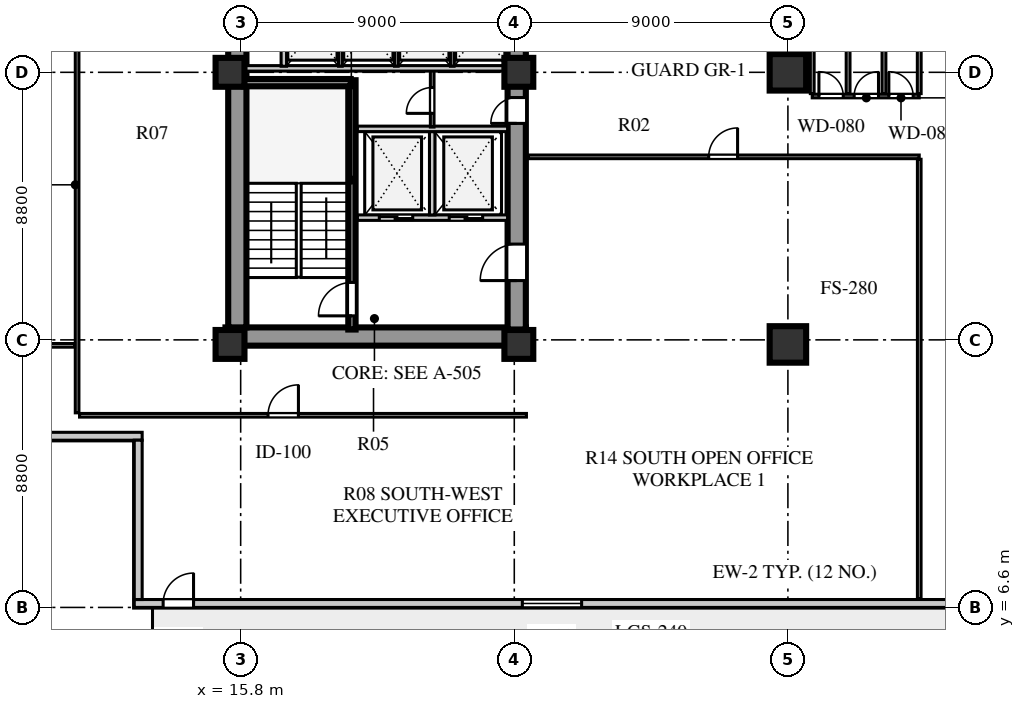
"""IFC4 building model, lengths in metres.
Left out: names, types, materials, properties, quantities, classifications, styles, units other than length and angle.
Written with IfcOpenShell. Run it as: python <this file> out.ifc"""

import sys

from ifc_helpers import new_model, si_unit, direction, frame, frame_2d, origin, origin_2d, place, context, subcontext, project, spatial, rectangle, extrude, element, fill, save


model = new_model("IFC4")
c1 = context("Model", 3, precision=1e-05, world=origin(), true_north=direction((0.0, 1.0)))
c2 = subcontext(c1, "Body", "Model", "MODEL_VIEW")
j1 = project(units=[si_unit("LENGTHUNIT", "METRE"), si_unit("PLANEANGLEUNIT", "RADIAN")], contexts=[c1])
p1 = place(None, origin())
s1 = spatial("IfcSite", under=j1, at=p1, CompositionType="ELEMENT")
p2 = place(p1, origin())
s2 = spatial("IfcBuilding", under=s1, at=p2, CompositionType="ELEMENT")
p3 = place(p2, frame((0.0, 0.0, 34.0)))
s3 = spatial("IfcBuildingStorey", under=s2, at=p3, CompositionType="ELEMENT", Elevation=34.0)
p4 = place(p3, frame((15.3, 15.51, 0.0), z_axis=(0.0, 0.0, 1.0), x_axis=(1.0, 0.0, 0.0)))
e1 = element("IfcWall", 1, at=p4, inside=s3, PredefinedType="SHEAR", context=c2, shape_type="SweptSolid", body=[
    extrude(rectangle(XDim=9.88, YDim=0.6, at=frame_2d((4.94, 0.0))), origin(), (0.0, 0.0, 1.0), 3.72),
])
p5 = place(p3, frame((15.69, 15.81, 0.0), z_axis=(0.0, 0.0, 1.0), x_axis=(0.0, 1.0, 0.0)))
e2 = element("IfcWall", 2, at=p5, inside=s3, PredefinedType="SHEAR", context=c2, shape_type="SweptSolid", body=[
    extrude(rectangle(XDim=25.63, YDim=0.6, at=frame_2d((12.815, 0.0))), origin(), (0.0, 0.0, 1.0), 3.72),
])
p6 = place(p3, frame((24.88, 15.74, 0.0), z_axis=(0.0, 0.0, 1.0), x_axis=(0.0, 1.0, 0.0)))
e3 = element("IfcWall", 3, at=p6, inside=s3, PredefinedType="SHEAR", context=c2, shape_type="SweptSolid", body=[
    extrude(rectangle(XDim=25.76, YDim=0.6, at=frame_2d((12.88, 0.0))), origin(), (0.0, 0.0, 1.0), 3.72),
])
p7 = place(p6, frame((1.61, 0.0, 0.0)))
e4 = element("IfcOpeningElement", 4, at=p7, cuts=e3, PredefinedType="OPENING", context=c2, shape_type="SweptSolid", body=[
    extrude(rectangle(XDim=1.2, YDim=2.1, at=frame_2d((0.6, 1.05))), frame((0.0, 0.31, 0.0), z_axis=(0.0, -1.0, 0.0), x_axis=(1.0, 0.0, 0.0)), (0.0, 0.0, 1.0), 0.62),
])
p8 = place(p6, frame((6.78, 0.0, 0.0)))
e5 = element("IfcOpeningElement", 5, at=p8, cuts=e3, PredefinedType="OPENING", context=c2, shape_type="SweptSolid", body=[
    extrude(rectangle(XDim=0.85, YDim=2.06, at=frame_2d((0.425, 1.03))), frame((0.0, 0.31, 0.0), z_axis=(0.0, -1.0, 0.0), x_axis=(1.0, 0.0, 0.0)), (0.0, 0.0, 1.0), 0.62),
])
p9 = place(p6, frame((12.11, 0.0, 0.0)))
e6 = element("IfcOpeningElement", 6, at=p9, cuts=e3, PredefinedType="OPENING", context=c2, shape_type="SweptSolid", body=[
    extrude(rectangle(XDim=1.5, YDim=2.12, at=frame_2d((0.75, 1.06))), frame((0.0, 0.31, 0.0), z_axis=(0.0, -1.0, 0.0), x_axis=(1.0, 0.0, 0.0)), (0.0, 0.0, 1.0), 0.62),
])
p10 = place(p6, frame((20.11, 0.0, 0.0)))
e7 = element("IfcOpeningElement", 7, at=p10, cuts=e3, PredefinedType="OPENING", context=c2, shape_type="SweptSolid", body=[
    extrude(rectangle(XDim=1.2, YDim=2.12, at=frame_2d((0.6, 1.06))), frame((0.0, 0.31, 0.0), z_axis=(0.0, -1.0, 0.0), x_axis=(1.0, 0.0, 0.0)), (0.0, 0.0, 1.0), 0.62),
])
p11 = place(p6, frame((24.01, 0.0, 0.0)))
e8 = element("IfcOpeningElement", 8, at=p11, cuts=e3, PredefinedType="OPENING", context=c2, shape_type="SweptSolid", body=[
    extrude(rectangle(XDim=0.95, YDim=2.1, at=frame_2d((0.475, 1.05))), frame((0.0, 0.31, 0.0), z_axis=(0.0, -1.0, 0.0), x_axis=(1.0, 0.0, 0.0)), (0.0, 0.0, 1.0), 0.62),
])
for number, where, z_axis, x_axis in (
    (9, (15.45, 15.25, 0.0), (0.0, 0.0, 1.0), (1.0, 0.0, 0.0)),
    (10, (15.45, 24.2, 0.0), (0.0, 0.0, 1.0), (1.0, 0.0, 0.0)),
    (11, (24.95, 15.25, 0.0), (0.0, 0.0, 1.0), (1.0, 0.0, 0.0)),
    (12, (24.95, 24.2, 0.0), (0.0, 0.0, 1.0), (1.0, 0.0, 0.0)),
):
    element("IfcColumn", number, at=place(p3, frame(where, z_axis=z_axis, x_axis=x_axis)), inside=s3, PredefinedType="COLUMN", context=c2, shape_type="SweptSolid", body=[
        extrude(rectangle(XDim=0.95, YDim=0.95, at=origin_2d()), origin(), (0.0, 0.0, 1.0), 3.72),
    ])
for number, where, z_axis, x_axis in (
    (13, (33.8, 15.25, 0.0), (0.0, 0.0, 1.0), (1.0, 0.0, 0.0)),
    (14, (33.8, 24.2, 0.0), (0.0, 0.0, 1.0), (1.0, 0.0, 0.0)),
):
    element("IfcColumn", number, at=place(p3, frame(where, z_axis=z_axis, x_axis=x_axis)), inside=s3, PredefinedType="COLUMN", context=c2, shape_type="SweptSolid", body=[
        extrude(rectangle(XDim=1.2, YDim=1.2, at=origin_2d()), origin(), (0.0, 0.0, 1.0), 3.72),
    ])
p12 = place(p3, frame((12.3, 6.73, 0.0), z_axis=(0.0, 0.0, 1.0), x_axis=(1.0, 0.0, 0.0)))
e15 = element("IfcWall", 15, at=p12, inside=s3, PredefinedType="SOLIDWALL", context=c2, shape_type="SweptSolid", body=[
    extrude(rectangle(XDim=34.0, YDim=0.26, at=frame_2d((17.0, 0.0))), origin(), (0.0, 0.0, 1.0), 3.72),
])
p13 = place(p12, frame((0.95, 0.0, 0.0)))
e16 = element("IfcOpeningElement", 16, at=p13, cuts=e15, PredefinedType="OPENING", context=c2, shape_type="SweptSolid", body=[
    extrude(rectangle(XDim=1.0, YDim=2.05, at=frame_2d((0.5, 1.025))), frame((0.0, 0.14, 0.0), z_axis=(0.0, -1.0, 0.0), x_axis=(1.0, 0.0, 0.0)), (0.0, 0.0, 1.0), 0.28),
])
p14 = place(p12, frame((12.765, 0.0, 0.8)))
e17 = element("IfcOpeningElement", 17, at=p14, cuts=e15, PredefinedType="OPENING", context=c2, shape_type="SweptSolid", body=[
    extrude(rectangle(XDim=1.95, YDim=2.0, at=frame_2d((0.975, 1.0))), frame((0.0, 0.14, 0.0), z_axis=(0.0, -1.0, 0.0), x_axis=(1.0, 0.0, 0.0)), (0.0, 0.0, 1.0), 0.28),
])
p15 = place(p12, frame((28.73, 0.0, 0.8)))
e18 = element("IfcOpeningElement", 18, at=p15, cuts=e15, PredefinedType="OPENING", context=c2, shape_type="SweptSolid", body=[
    extrude(rectangle(XDim=2.25, YDim=2.0, at=frame_2d((1.125, 1.0))), frame((0.0, 0.14, 0.0), z_axis=(0.0, -1.0, 0.0), x_axis=(1.0, 0.0, 0.0)), (0.0, 0.0, 1.0), 0.28),
])
p16 = place(p3, frame((6.8, 12.23, 0.0), z_axis=(0.0, 0.0, 1.0), x_axis=(1.0, 0.0, 0.0)))
e19 = element("IfcWall", 19, at=p16, inside=s3, PredefinedType="SOLIDWALL", context=c2, shape_type="SweptSolid", body=[
    extrude(rectangle(XDim=5.76, YDim=0.26, at=frame_2d((2.88, 0.0))), origin(), (0.0, 0.0, 1.0), 3.72),
])
p17 = place(p3, frame((12.43, 12.1, 0.0), z_axis=(0.0, 0.0, 1.0), x_axis=(0.0, -1.0, 0.0)))
e20 = element("IfcWall", 20, at=p17, inside=s3, PredefinedType="SOLIDWALL", context=c2, shape_type="SweptSolid", body=[
    extrude(rectangle(XDim=5.24, YDim=0.26, at=frame_2d((2.62, 0.0))), origin(), (0.0, 0.0, 1.0), 3.72),
])
p18 = place(p3, frame((19.46, 15.74, 0.0), z_axis=(0.0, 0.0, 1.0), x_axis=(0.0, 1.0, 0.0)))
e21 = element("IfcWall", 21, at=p18, inside=s3, PredefinedType="SHEAR", context=c2, shape_type="SweptSolid", body=[
    extrude(rectangle(XDim=8.2, YDim=0.24, at=frame_2d((4.1, 0.0))), origin(), (0.0, 0.0, 1.0), 4.0),
])
p19 = place(p18, frame((0.45, 0.0, 0.0)))
e22 = element("IfcOpeningElement", 22, at=p19, cuts=e21, PredefinedType="OPENING", context=c2, shape_type="SweptSolid", body=[
    extrude(rectangle(XDim=1.1, YDim=2.1, at=frame_2d((0.55, 1.05))), frame((0.0, 0.13, 0.0), z_axis=(0.0, -1.0, 0.0), x_axis=(1.0, 0.0, 0.0)), (0.0, 0.0, 1.0), 0.26),
])
p20 = place(p3, frame((15.9, 23.86, 0.0), z_axis=(0.0, 0.0, 1.0), x_axis=(1.0, 0.0, 0.0)))
e23 = element("IfcWall", 23, at=p20, inside=s3, PredefinedType="SHEAR", context=c2, shape_type="SweptSolid", body=[
    extrude(rectangle(XDim=3.52, YDim=0.24, at=frame_2d((1.76, 0.0))), origin(), (0.0, 0.0, 1.0), 4.0),
])
p21 = place(p3, frame((19.64, 19.42, 0.0), z_axis=(0.0, 0.0, 1.0), x_axis=(1.0, 0.0, 0.0)))
e24 = element("IfcWall", 24, at=p21, inside=s3, PredefinedType="SOLIDWALL", context=c2, shape_type="SweptSolid", body=[
    extrude(rectangle(XDim=4.94, YDim=0.18, at=frame_2d((2.47, 0.0))), origin(), (0.0, 0.0, 1.0), 3.72),
])
p22 = place(p21, frame((0.72, 0.0, 0.0)))
e25 = element("IfcOpeningElement", 25, at=p22, cuts=e24, PredefinedType="OPENING", context=c2, shape_type="SweptSolid", body=[
    extrude(rectangle(XDim=1.1, YDim=2.1, at=frame_2d((0.55, 1.05))), frame((0.0, 0.1, 0.0), z_axis=(0.0, -1.0, 0.0), x_axis=(1.0, 0.0, 0.0)), (0.0, 0.0, 1.0), 0.2),
])
p23 = place(p21, frame((3.02, 0.0, 0.0)))
e26 = element("IfcOpeningElement", 26, at=p23, cuts=e24, PredefinedType="OPENING", context=c2, shape_type="SweptSolid", body=[
    extrude(rectangle(XDim=1.1, YDim=2.1, at=frame_2d((0.55, 1.05))), frame((0.0, 0.1, 0.0), z_axis=(0.0, -1.0, 0.0), x_axis=(1.0, 0.0, 0.0)), (0.0, 0.0, 1.0), 0.2),
])
p24 = place(p3, frame((22.1, 19.51, 0.0), z_axis=(0.0, 0.0, 1.0), x_axis=(0.0, 1.0, 0.0)))
e27 = element("IfcWall", 27, at=p24, inside=s3, PredefinedType="SOLIDWALL", context=c2, shape_type="SweptSolid", body=[
    extrude(rectangle(XDim=2.74, YDim=0.18, at=frame_2d((1.37, 0.0))), origin(), (0.0, 0.0, 1.0), 3.72),
])
p25 = place(p3, frame((19.64, 22.34, 0.0), z_axis=(0.0, 0.0, 1.0), x_axis=(1.0, 0.0, 0.0)))
e28 = element("IfcWall", 28, at=p25, inside=s3, PredefinedType="SOLIDWALL", context=c2, shape_type="SweptSolid", body=[
    extrude(rectangle(XDim=4.94, YDim=0.18, at=frame_2d((2.47, 0.0))), origin(), (0.0, 0.0, 1.0), 3.72),
])
p26 = place(p3, frame((22.1, 22.4, 0.0), z_axis=(0.0, 0.0, 1.0), x_axis=(0.0, 1.0, 0.0)))
e29 = element("IfcWall", 29, at=p26, inside=s3, PredefinedType="PARTITIONING", context=c2, shape_type="SweptSolid", body=[
    extrude(rectangle(XDim=1.88, YDim=0.12, at=frame_2d((0.94, 0.0))), origin(), (0.0, 0.0, 1.0), 3.72),
])
p27 = place(p26, frame((0.45, 0.0, 0.0)))
e30 = element("IfcOpeningElement", 30, at=p27, cuts=e29, PredefinedType="OPENING", context=c2, shape_type="SweptSolid", body=[
    extrude(rectangle(XDim=0.85, YDim=2.06, at=frame_2d((0.425, 1.03))), frame((0.0, 0.07, 0.0), z_axis=(0.0, -1.0, 0.0), x_axis=(1.0, 0.0, 0.0)), (0.0, 0.0, 1.0), 0.14),
])
p28 = place(p3, frame((15.9, 24.33, 0.0), z_axis=(0.0, 0.0, 1.0), x_axis=(1.0, 0.0, 0.0)))
e31 = element("IfcWall", 31, at=p28, inside=s3, PredefinedType="SOLIDWALL", context=c2, shape_type="SweptSolid", body=[
    extrude(rectangle(XDim=8.68, YDim=0.18, at=frame_2d((4.34, 0.0))), origin(), (0.0, 0.0, 1.0), 3.02),
])
p29 = place(p3, frame((17.22, 24.4, 0.0), z_axis=(0.0, 0.0, 1.0), x_axis=(0.0, 1.0, 0.0)))
e32 = element("IfcWall", 32, at=p29, inside=s3, PredefinedType="SOLIDWALL", context=c2, shape_type="SweptSolid", body=[
    extrude(rectangle(XDim=2.05, YDim=0.18, at=frame_2d((1.025, 0.0))), origin(), (0.0, 0.0, 1.0), 3.72),
])
for number, where, z_axis, x_axis in (
    (33, (19.08, 24.4, 0.0), (0.0, 0.0, 1.0), (0.0, 1.0, 0.0)),
    (34, (20.92, 24.4, 0.0), (0.0, 0.0, 1.0), (0.0, 1.0, 0.0)),
    (35, (22.76, 24.4, 0.0), (0.0, 0.0, 1.0), (0.0, 1.0, 0.0)),
):
    element("IfcWall", number, at=place(p3, frame(where, z_axis=z_axis, x_axis=x_axis)), inside=s3, PredefinedType="PARTITIONING", context=c2, shape_type="SweptSolid", body=[
        extrude(rectangle(XDim=2.05, YDim=0.12, at=frame_2d((1.025, 0.0))), origin(), (0.0, 0.0, 1.0), 3.72),
    ])
p30 = place(p3, frame((25.25, 21.42, 0.0), z_axis=(0.0, 0.0, 1.0), x_axis=(1.0, 0.0, 0.0)))
e36 = element("IfcWall", 36, at=p30, inside=s3, PredefinedType="PARTITIONING", context=c2, shape_type="SweptSolid", body=[
    extrude(rectangle(XDim=12.87, YDim=0.12, at=frame_2d((6.435, 0.0))), origin(), (0.0, 0.0, 1.0), 3.32),
])
p31 = place(p30, frame((5.945, 0.0, 0.0)))
e37 = element("IfcOpeningElement", 37, at=p31, cuts=e36, PredefinedType="OPENING", context=c2, shape_type="SweptSolid", body=[
    extrude(rectangle(XDim=0.95, YDim=2.08, at=frame_2d((0.475, 1.04))), frame((0.0, 0.07, 0.0), z_axis=(0.0, -1.0, 0.0), x_axis=(1.0, 0.0, 0.0)), (0.0, 0.0, 1.0), 0.14),
])
p32 = place(p3, frame((38.12, 6.88, 0.0), z_axis=(0.0, 0.0, 1.0), x_axis=(0.0, 1.0, 0.0)))
e38 = element("IfcWall", 38, at=p32, inside=s3, PredefinedType="PARTITIONING", context=c2, shape_type="SweptSolid", body=[
    extrude(rectangle(XDim=14.46, YDim=0.12, at=frame_2d((7.23, 0.0))), origin(), (0.0, 0.0, 1.0), 3.72),
])
p33 = place(p3, frame((34.6, 23.42, 0.0), z_axis=(0.0, 0.0, 1.0), x_axis=(1.0, 0.0, 0.0)))
e39 = element("IfcWall", 39, at=p33, inside=s3, PredefinedType="PARTITIONING", context=c2, shape_type="SweptSolid", body=[
    extrude(rectangle(XDim=3.52, YDim=0.12, at=frame_2d((1.76, 0.0))), origin(), (0.0, 0.0, 1.0), 3.72),
])
p34 = place(p33, frame((0.22, 0.0, 0.0)))
e40 = element("IfcOpeningElement", 40, at=p34, cuts=e39, PredefinedType="OPENING", context=c2, shape_type="SweptSolid", body=[
    extrude(rectangle(XDim=0.8, YDim=2.05, at=frame_2d((0.4, 1.025))), frame((0.0, 0.07, 0.0), z_axis=(0.0, -1.0, 0.0), x_axis=(1.0, 0.0, 0.0)), (0.0, 0.0, 1.0), 0.14),
])
p35 = place(p33, frame((1.38, 0.0, 0.0)))
e41 = element("IfcOpeningElement", 41, at=p35, cuts=e39, PredefinedType="OPENING", context=c2, shape_type="SweptSolid", body=[
    extrude(rectangle(XDim=0.8, YDim=2.05, at=frame_2d((0.4, 1.025))), frame((0.0, 0.07, 0.0), z_axis=(0.0, -1.0, 0.0), x_axis=(1.0, 0.0, 0.0)), (0.0, 0.0, 1.0), 0.14),
])
p36 = place(p33, frame((2.52, 0.0, 0.0)))
e42 = element("IfcOpeningElement", 42, at=p36, cuts=e39, PredefinedType="OPENING", context=c2, shape_type="SweptSolid", body=[
    extrude(rectangle(XDim=0.8, YDim=2.05, at=frame_2d((0.4, 1.025))), frame((0.0, 0.07, 0.0), z_axis=(0.0, -1.0, 0.0), x_axis=(1.0, 0.0, 0.0)), (0.0, 0.0, 1.0), 0.14),
])
p37 = place(p3, frame((10.42, 13.0, 0.0), z_axis=(0.0, 0.0, 1.0), x_axis=(0.0, 1.0, 0.0)))
e43 = element("IfcWall", 43, at=p37, inside=s3, PredefinedType="PARTITIONING", context=c2, shape_type="SweptSolid", body=[
    extrude(rectangle(XDim=31.2, YDim=0.12, at=frame_2d((15.6, 0.0))), origin(), (0.0, 0.0, 1.0), 3.72),
])
p38 = place(p37, frame((15.15, 0.0, 0.0)))
e44 = element("IfcOpeningElement", 44, at=p38, cuts=e43, PredefinedType="OPENING", context=c2, shape_type="SweptSolid", body=[
    extrude(rectangle(XDim=0.95, YDim=2.08, at=frame_2d((0.475, 1.04))), frame((0.0, 0.07, 0.0), z_axis=(0.0, -1.0, 0.0), x_axis=(1.0, 0.0, 0.0)), (0.0, 0.0, 1.0), 0.14),
])
p39 = place(p3, frame((7.08, 15.22, 0.0), z_axis=(0.0, 0.0, 1.0), x_axis=(1.0, 0.0, 0.0)))
e45 = element("IfcWall", 45, at=p39, inside=s3, PredefinedType="PARTITIONING", context=c2, shape_type="SweptSolid", body=[
    extrude(rectangle(XDim=3.26, YDim=0.12, at=frame_2d((1.63, 0.0))), origin(), (0.0, 0.0, 1.0), 3.22),
])
p40 = place(p3, frame((10.5, 12.92, 0.0), z_axis=(0.0, 0.0, 1.0), x_axis=(1.0, 0.0, 0.0)))
e46 = element("IfcWall", 46, at=p40, inside=s3, PredefinedType="PARTITIONING", context=c2, shape_type="SweptSolid", body=[
    extrude(rectangle(XDim=14.7, YDim=0.12, at=frame_2d((7.35, 0.0))), origin(), (0.0, 0.0, 1.0), 3.72),
])
p41 = place(p40, frame((6.2, 0.0, 0.0)))
e47 = element("IfcOpeningElement", 47, at=p41, cuts=e46, PredefinedType="OPENING", context=c2, shape_type="SweptSolid", body=[
    extrude(rectangle(XDim=1.0, YDim=2.08, at=frame_2d((0.5, 1.04))), frame((0.0, 0.07, 0.0), z_axis=(0.0, -1.0, 0.0), x_axis=(1.0, 0.0, 0.0)), (0.0, 0.0, 1.0), 0.14),
])
for number, where, z_axis, x_axis in (
    (48, (34.6, 23.5, 0.0), (0.0, 0.0, 1.0), (0.0, 1.0, 0.0)),
    (49, (38.12, 23.5, 0.0), (0.0, 0.0, 1.0), (0.0, 1.0, 0.0)),
    (50, (35.78, 23.5, 0.0), (0.0, 0.0, 1.0), (0.0, 1.0, 0.0)),
    (51, (36.96, 23.5, 0.0), (0.0, 0.0, 1.0), (0.0, 1.0, 0.0)),
):
    element("IfcWall", number, at=place(p3, frame(where, z_axis=z_axis, x_axis=x_axis)), inside=s3, PredefinedType="PLUMBINGWALL", context=c2, shape_type="SweptSolid", body=[
        extrude(rectangle(XDim=3.62, YDim=0.125, at=frame_2d((1.81, 0.0))), origin(), (0.0, 0.0, 1.0), 3.72),
    ])
p42 = place(p13, frame((1.0, 0.0, 0.0), z_axis=(0.0, 0.0, 1.0), x_axis=(-1.0, 0.0, 0.0)))
e52 = element("IfcDoor", 52, at=p42, inside=s3, OperationType="SINGLE_SWING_LEFT", PredefinedType="DOOR", context=c2, shape_type="SweptSolid", body=[
    extrude(rectangle(XDim=1.0, YDim=2.05, at=frame_2d((0.5, 1.025))), frame((0.0, 0.025, 0.0), z_axis=(0.0, -1.0, 0.0), x_axis=(1.0, 0.0, 0.0)), (0.0, 0.0, 1.0), 0.05),
])
fill(e16, e52)
p43 = place(p14, origin())
e53 = element("IfcWindow", 53, at=p43, inside=s3, PartitioningType="SINGLE_PANEL", PredefinedType="WINDOW", context=c2, shape_type="SweptSolid", body=[
    extrude(rectangle(XDim=1.95, YDim=2.0, at=frame_2d((0.975, 1.0))), frame((0.0, 0.03, 0.0), z_axis=(0.0, -1.0, 0.0), x_axis=(1.0, 0.0, 0.0)), (0.0, 0.0, 1.0), 0.06),
])
fill(e17, e53)
p44 = place(p19, origin())
e54 = element("IfcDoor", 54, at=p44, inside=s3, OperationType="SINGLE_SWING_LEFT", PredefinedType="DOOR", context=c2, shape_type="SweptSolid", body=[
    extrude(rectangle(XDim=1.1, YDim=2.1, at=frame_2d((0.55, 1.05))), frame((0.0, 0.025, 0.0), z_axis=(0.0, -1.0, 0.0), x_axis=(1.0, 0.0, 0.0)), (0.0, 0.0, 1.0), 0.05),
])
fill(e22, e54)
p45 = place(p22, origin())
e55 = element("IfcDoor", 55, at=p45, inside=s3, OperationType="DOUBLE_DOOR_SLIDING", PredefinedType="DOOR", context=c2, shape_type="SweptSolid", body=[
    extrude(rectangle(XDim=1.1, YDim=2.1, at=frame_2d((0.55, 1.05))), frame((0.0, 0.025, 0.0), z_axis=(0.0, -1.0, 0.0), x_axis=(1.0, 0.0, 0.0)), (0.0, 0.0, 1.0), 0.05),
])
fill(e25, e55)
p46 = place(p23, origin())
e56 = element("IfcDoor", 56, at=p46, inside=s3, OperationType="DOUBLE_DOOR_SLIDING", PredefinedType="DOOR", context=c2, shape_type="SweptSolid", body=[
    extrude(rectangle(XDim=1.1, YDim=2.1, at=frame_2d((0.55, 1.05))), frame((0.0, 0.025, 0.0), z_axis=(0.0, -1.0, 0.0), x_axis=(1.0, 0.0, 0.0)), (0.0, 0.0, 1.0), 0.05),
])
fill(e26, e56)
p47 = place(p7, frame((1.2, 0.0, 0.0), z_axis=(0.0, 0.0, 1.0), x_axis=(-1.0, 0.0, 0.0)))
e57 = element("IfcDoor", 57, at=p47, inside=s3, OperationType="SINGLE_SWING_RIGHT", PredefinedType="DOOR", context=c2, shape_type="SweptSolid", body=[
    extrude(rectangle(XDim=1.2, YDim=2.1, at=frame_2d((0.6, 1.05))), frame((0.0, 0.025, 0.0), z_axis=(0.0, -1.0, 0.0), x_axis=(1.0, 0.0, 0.0)), (0.0, 0.0, 1.0), 0.05),
])
fill(e4, e57)
p48 = place(p27, origin())
e58 = element("IfcDoor", 58, at=p48, inside=s3, OperationType="SINGLE_SWING_LEFT", PredefinedType="DOOR", context=c2, shape_type="SweptSolid", body=[
    extrude(rectangle(XDim=0.85, YDim=2.06, at=frame_2d((0.425, 1.03))), frame((0.0, 0.025, 0.0), z_axis=(0.0, -1.0, 0.0), x_axis=(1.0, 0.0, 0.0)), (0.0, 0.0, 1.0), 0.05),
])
fill(e30, e58)
p49 = place(p8, frame((0.85, 0.0, 0.0), z_axis=(0.0, 0.0, 1.0), x_axis=(-1.0, 0.0, 0.0)))
e59 = element("IfcDoor", 59, at=p49, inside=s3, OperationType="SINGLE_SWING_RIGHT", PredefinedType="DOOR", context=c2, shape_type="SweptSolid", body=[
    extrude(rectangle(XDim=0.85, YDim=2.06, at=frame_2d((0.425, 1.03))), frame((0.0, 0.025, 0.0), z_axis=(0.0, -1.0, 0.0), x_axis=(1.0, 0.0, 0.0)), (0.0, 0.0, 1.0), 0.05),
])
fill(e5, e59)
p50 = place(p41, frame((1.0, 0.0, 0.0), z_axis=(0.0, 0.0, 1.0), x_axis=(-1.0, 0.0, 0.0)))
e60 = element("IfcDoor", 60, at=p50, inside=s3, OperationType="SINGLE_SWING_LEFT", PredefinedType="DOOR", context=c2, shape_type="SweptSolid", body=[
    extrude(rectangle(XDim=1.0, YDim=2.08, at=frame_2d((0.5, 1.04))), frame((0.0, 0.025, 0.0), z_axis=(0.0, -1.0, 0.0), x_axis=(1.0, 0.0, 0.0)), (0.0, 0.0, 1.0), 0.05),
])
fill(e47, e60)
p51 = place(p34, origin())
e61 = element("IfcDoor", 61, at=p51, inside=s3, OperationType="SINGLE_SWING_LEFT", PredefinedType="DOOR", context=c2, shape_type="SweptSolid", body=[
    extrude(rectangle(XDim=0.8, YDim=2.05, at=frame_2d((0.4, 1.025))), frame((0.0, 0.025, 0.0), z_axis=(0.0, -1.0, 0.0), x_axis=(1.0, 0.0, 0.0)), (0.0, 0.0, 1.0), 0.05),
])
fill(e40, e61)
p52 = place(p35, origin())
e62 = element("IfcDoor", 62, at=p52, inside=s3, OperationType="SINGLE_SWING_RIGHT", PredefinedType="DOOR", context=c2, shape_type="SweptSolid", body=[
    extrude(rectangle(XDim=0.8, YDim=2.05, at=frame_2d((0.4, 1.025))), frame((0.0, 0.025, 0.0), z_axis=(0.0, -1.0, 0.0), x_axis=(1.0, 0.0, 0.0)), (0.0, 0.0, 1.0), 0.05),
])
fill(e41, e62)
p53 = place(p36, origin())
e63 = element("IfcDoor", 63, at=p53, inside=s3, OperationType="SINGLE_SWING_LEFT", PredefinedType="DOOR", context=c2, shape_type="SweptSolid", body=[
    extrude(rectangle(XDim=0.8, YDim=2.05, at=frame_2d((0.4, 1.025))), frame((0.0, 0.025, 0.0), z_axis=(0.0, -1.0, 0.0), x_axis=(1.0, 0.0, 0.0)), (0.0, 0.0, 1.0), 0.05),
])
fill(e42, e63)
p54 = place(p31, frame((0.95, 0.0, 0.0), z_axis=(0.0, 0.0, 1.0), x_axis=(-1.0, 0.0, 0.0)))
e64 = element("IfcDoor", 64, at=p54, inside=s3, OperationType="SINGLE_SWING_LEFT", PredefinedType="DOOR", context=c2, shape_type="SweptSolid", body=[
    extrude(rectangle(XDim=0.95, YDim=2.08, at=frame_2d((0.475, 1.04))), frame((0.0, 0.025, 0.0), z_axis=(0.0, -1.0, 0.0), x_axis=(1.0, 0.0, 0.0)), (0.0, 0.0, 1.0), 0.05),
])
fill(e37, e64)
save(model, sys.argv[1])
